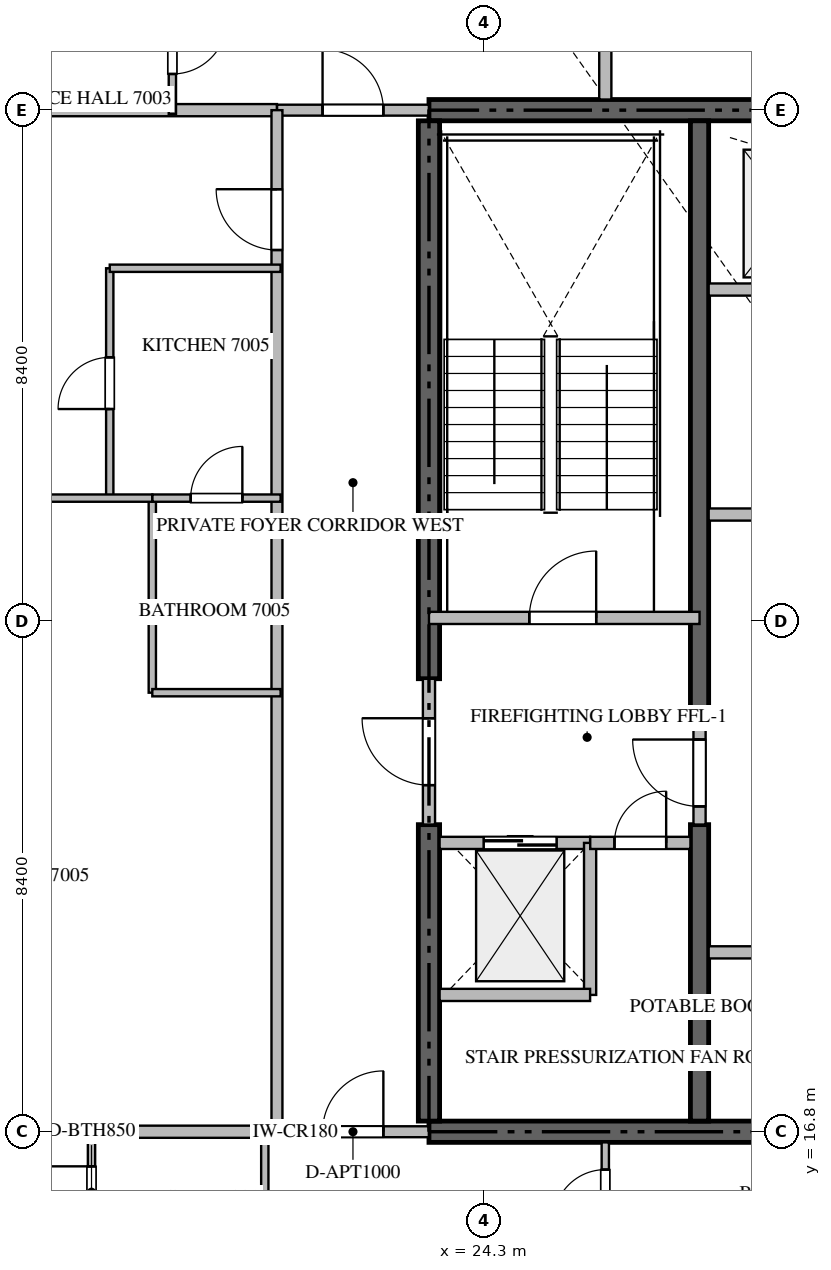
"""IFC4 building model, lengths in metres.
Left out: names, types, materials, properties, quantities, classifications, styles, units other than length and angle.
Written with IfcOpenShell. Run it as: python <this file> out.ifc"""

import sys

from ifc_helpers import new_model, si_unit, direction, frame, frame_2d, origin, place, context, subcontext, project, spatial, rectangle, extrude, source, transform, mapped, element, fill, save


model = new_model("IFC4")
c1 = context("Model", 3, precision=1e-05, world=origin(), true_north=direction((0.0, 1.0)))
c2 = subcontext(c1, "Body", "Model", "MODEL_VIEW")
j1 = project(units=[si_unit("LENGTHUNIT", "METRE"), si_unit("PLANEANGLEUNIT", "RADIAN")], contexts=[c1])
p1 = place(None, origin())
s1 = spatial("IfcSite", under=j1, at=p1, CompositionType="ELEMENT")
p2 = place(p1, origin())
s2 = spatial("IfcBuilding", under=s1, at=p2, CompositionType="ELEMENT")
p3 = place(p2, frame((0.0, 0.0, 279.75)))
s3 = spatial("IfcBuildingStorey", under=s2, at=p3, CompositionType="ELEMENT", Elevation=279.75)
for number, where, z_axis, x_axis in (
    (1, (23.4, 16.8, -0.26), (0.0, 0.0, 1.0), (1.0, 0.0, 0.0)),
    (2, (41.4, 33.6, -0.26), (0.0, 0.0, 1.0), (-1.0, 0.0, 0.0)),
):
    element("IfcWall", number, at=place(p3, frame(where, z_axis=z_axis, x_axis=x_axis)), inside=s3, PredefinedType="SHEAR", context=c2, shape_type="SweptSolid", body=[
        extrude(rectangle(XDim=18.0, YDim=0.35, at=frame_2d((9.0, 0.0))), origin(), (0.0, 0.0, 1.0), 3.848),
    ])
p4 = place(p3, frame((23.4, 16.975, -0.26), z_axis=(0.0, 0.0, 1.0), x_axis=(0.0, 1.0, 0.0)))
e3 = element("IfcWall", 3, at=p4, inside=s3, PredefinedType="SHEAR", context=c2, shape_type="SweptSolid", body=[
    extrude(rectangle(XDim=4.875, YDim=0.35, at=frame_2d((2.438, 0.0))), origin(), (0.0, 0.0, 1.0), 3.848),
])
p5 = place(p3, frame((23.4, 24.25, -0.26), z_axis=(0.0, 0.0, 1.0), x_axis=(0.0, 1.0, 0.0)))
e4 = element("IfcWall", 4, at=p5, inside=s3, PredefinedType="SHEAR", context=c2, shape_type="SweptSolid", body=[
    extrude(rectangle(XDim=9.175, YDim=0.35, at=frame_2d((4.587, 0.0))), origin(), (0.0, 0.0, 1.0), 3.848),
])
p6 = place(p3, frame((27.85, 16.975, -0.26), z_axis=(0.0, 0.0, 1.0), x_axis=(0.0, 1.0, 0.0)))
e5 = element("IfcWall", 5, at=p6, inside=s3, PredefinedType="SHEAR", context=c2, shape_type="SweptSolid", body=[
    extrude(rectangle(XDim=4.875, YDim=0.3, at=frame_2d((2.438, 0.0))), origin(), (0.0, 0.0, 1.0), 3.848),
])
p7 = place(p3, frame((27.85, 23.55, -0.26), z_axis=(0.0, 0.0, 1.0), x_axis=(0.0, 1.0, 0.0)))
e6 = element("IfcWall", 6, at=p7, inside=s3, PredefinedType="SHEAR", context=c2, shape_type="SweptSolid", body=[
    extrude(rectangle(XDim=9.875, YDim=0.3, at=frame_2d((4.938, 0.0))), origin(), (0.0, 0.0, 1.0), 3.848),
])
p8 = place(p3, frame((23.4, 25.25, 0.0), z_axis=(0.0, 0.0, 1.0), x_axis=(1.0, 0.0, 0.0)))
e7 = element("IfcWall", 7, at=p8, inside=s3, PredefinedType="STANDARD", context=c2, shape_type="SweptSolid", body=[
    extrude(rectangle(XDim=4.45, YDim=0.2, at=frame_2d((2.225, 0.0))), origin(), (0.0, 0.0, 1.0), 3.59),
])
p9 = place(p8, frame((1.65, 0.0, 0.0)))
e8 = element("IfcOpeningElement", 8, at=p9, cuts=e7, PredefinedType="OPENING", context=c2, shape_type="SweptSolid", body=[
    extrude(rectangle(XDim=1.1, YDim=2.15, at=frame_2d((0.55, 1.075))), frame((0.0, 0.11, 0.0), z_axis=(0.0, -1.0, 0.0), x_axis=(1.0, 0.0, 0.0)), (0.0, 0.0, 1.0), 0.22),
])
p10 = place(p3, frame((23.575, 21.55, 0.0), z_axis=(0.0, 0.0, 1.0), x_axis=(1.0, 0.0, 0.0)))
e9 = element("IfcWall", 9, at=p10, inside=s3, PredefinedType="STANDARD", context=c2, shape_type="SweptSolid", body=[
    extrude(rectangle(XDim=2.475, YDim=0.2, at=frame_2d((1.238, 0.0))), origin(), (0.0, 0.0, 1.0), 3.59),
])
p11 = place(p10, frame((0.725, 0.0, 0.0)))
e10 = element("IfcOpeningElement", 10, at=p11, cuts=e9, PredefinedType="OPENING", context=c2, shape_type="SweptSolid", body=[
    extrude(rectangle(XDim=1.2, YDim=2.2, at=frame_2d((0.6, 1.1))), frame((0.0, 0.11, 0.0), z_axis=(0.0, -1.0, 0.0), x_axis=(1.0, 0.0, 0.0)), (0.0, 0.0, 1.0), 0.22),
])
p12 = place(p3, frame((28.0, 30.65, 0.0), z_axis=(0.0, 0.0, 1.0), x_axis=(1.0, 0.0, 0.0)))
e11 = element("IfcWall", 11, at=p12, inside=s3, PredefinedType="STANDARD", context=c2, shape_type="SweptSolid", body=[
    extrude(rectangle(XDim=2.55, YDim=0.2, at=frame_2d((1.275, 0.0))), origin(), (0.0, 0.0, 1.0), 3.59),
])
p13 = place(p12, frame((0.85, 0.0, 0.0)))
e12 = element("IfcOpeningElement", 12, at=p13, cuts=e11, PredefinedType="OPENING", context=c2, shape_type="SweptSolid", body=[
    extrude(rectangle(XDim=1.1, YDim=2.2, at=frame_2d((0.55, 1.1))), frame((0.0, 0.11, 0.0), z_axis=(0.0, -1.0, 0.0), x_axis=(1.0, 0.0, 0.0)), (0.0, 0.0, 1.0), 0.22),
])
p14 = place(p3, frame((26.05, 19.05, 0.0), z_axis=(0.0, 0.0, 1.0), x_axis=(0.0, 1.0, 0.0)))
e13 = element("IfcWall", 13, at=p14, inside=s3, PredefinedType="STANDARD", context=c2, shape_type="SweptSolid", body=[
    extrude(rectangle(XDim=2.5, YDim=0.2, at=frame_2d((1.25, 0.0))), origin(), (0.0, 0.0, 1.0), 3.59),
])
p15 = place(p3, frame((23.575, 19.05, 0.0), z_axis=(0.0, 0.0, 1.0), x_axis=(1.0, 0.0, 0.0)))
e14 = element("IfcWall", 14, at=p15, inside=s3, PredefinedType="STANDARD", context=c2, shape_type="SweptSolid", body=[
    extrude(rectangle(XDim=2.475, YDim=0.2, at=frame_2d((1.238, 0.0))), origin(), (0.0, 0.0, 1.0), 3.59),
])
p16 = place(p3, frame((26.052, 21.55, 0.0), z_axis=(0.0, 0.0, 1.0), x_axis=(1.0, 0.0, 0.0)))
e15 = element("IfcWall", 15, at=p16, inside=s3, PredefinedType="STANDARD", context=c2, shape_type="SweptSolid", body=[
    extrude(rectangle(XDim=1.648, YDim=0.2, at=frame_2d((0.824, 0.0))), origin(), (0.0, 0.0, 1.0), 3.59),
])
p17 = place(p16, frame((0.399, 0.0, 0.0)))
e16 = element("IfcOpeningElement", 16, at=p17, cuts=e15, PredefinedType="OPENING", context=c2, shape_type="SweptSolid", body=[
    extrude(rectangle(XDim=0.85, YDim=2.1, at=frame_2d((0.425, 1.05))), frame((0.0, 0.11, 0.0), z_axis=(0.0, -1.0, 0.0), x_axis=(1.0, 0.0, 0.0)), (0.0, 0.0, 1.0), 0.22),
])
p18 = place(p3, frame((23.4, 21.852, 0.0), z_axis=(0.0, 0.0, 1.0), x_axis=(0.0, 1.0, 0.0)))
e17 = element("IfcWall", 17, at=p18, inside=s3, PredefinedType="STANDARD", context=c2, shape_type="SweptSolid", body=[
    extrude(rectangle(XDim=2.396, YDim=0.2, at=frame_2d((1.198, 0.0))), origin(), (0.0, 0.0, 1.0), 3.59),
])
p19 = place(p18, frame((0.648, 0.0, 0.0)))
e18 = element("IfcOpeningElement", 18, at=p19, cuts=e17, PredefinedType="OPENING", context=c2, shape_type="SweptSolid", body=[
    extrude(rectangle(XDim=1.1, YDim=2.15, at=frame_2d((0.55, 1.075))), frame((0.0, 0.11, 0.0), z_axis=(0.0, -1.0, 0.0), x_axis=(1.0, 0.0, 0.0)), (0.0, 0.0, 1.0), 0.22),
])
p20 = place(p3, frame((27.85, 21.852, 0.0), z_axis=(0.0, 0.0, 1.0), x_axis=(0.0, 1.0, 0.0)))
e19 = element("IfcWall", 19, at=p20, inside=s3, PredefinedType="STANDARD", context=c2, shape_type="SweptSolid", body=[
    extrude(rectangle(XDim=1.696, YDim=0.2, at=frame_2d((0.848, 0.0))), origin(), (0.0, 0.0, 1.0), 3.59),
])
p21 = place(p20, frame((0.298, 0.0, 0.0)))
e20 = element("IfcOpeningElement", 20, at=p21, cuts=e19, PredefinedType="OPENING", context=c2, shape_type="SweptSolid", body=[
    extrude(rectangle(XDim=1.1, YDim=2.15, at=frame_2d((0.55, 1.075))), frame((0.0, 0.11, 0.0), z_axis=(0.0, -1.0, 0.0), x_axis=(1.0, 0.0, 0.0)), (0.0, 0.0, 1.0), 0.22),
])
p22 = place(p3, frame((28.0, 19.75, 0.0), z_axis=(0.0, 0.0, 1.0), x_axis=(1.0, 0.0, 0.0)))
e21 = element("IfcWall", 21, at=p22, inside=s3, PredefinedType="STANDARD", context=c2, shape_type="SweptSolid", body=[
    extrude(rectangle(XDim=3.4, YDim=0.2, at=frame_2d((1.7, 0.0))), origin(), (0.0, 0.0, 1.0), 3.59),
])
p23 = place(p22, frame((1.275, 0.0, 0.0)))
e22 = element("IfcOpeningElement", 22, at=p23, cuts=e21, PredefinedType="OPENING", context=c2, shape_type="SweptSolid", body=[
    extrude(rectangle(XDim=0.85, YDim=2.1, at=frame_2d((0.425, 1.05))), frame((0.0, 0.11, 0.0), z_axis=(0.0, -1.0, 0.0), x_axis=(1.0, 0.0, 0.0)), (0.0, 0.0, 1.0), 0.22),
])
p24 = place(p3, frame((28.0, 26.95, 0.0), z_axis=(0.0, 0.0, 1.0), x_axis=(1.0, 0.0, 0.0)))
e23 = element("IfcWall", 23, at=p24, inside=s3, PredefinedType="STANDARD", context=c2, shape_type="SweptSolid", body=[
    extrude(rectangle(XDim=6.95, YDim=0.2, at=frame_2d((3.475, 0.0))), origin(), (0.0, 0.0, 1.0), 3.59),
])
p25 = place(p3, frame((26.3, 33.775, 0.0), z_axis=(0.0, 0.0, 1.0), x_axis=(0.0, 1.0, 0.0)))
e24 = element("IfcWall", 24, at=p25, inside=s3, PredefinedType="PARTITIONING", context=c2, shape_type="SweptSolid", body=[
    extrude(rectangle(XDim=15.343, YDim=0.2, at=frame_2d((7.671, 0.0))), origin(), (0.0, 0.0, 1.0), 3.59),
])
for number, where, z_axis, x_axis in (
    (25, (7.482, 16.8, 0.0), (0.0, 0.0, 1.0), (1.0, 0.0, 0.0)),
    (26, (7.482, 33.6, 0.0), (0.0, 0.0, 1.0), (1.0, 0.0, 0.0)),
):
    element("IfcWall", number, at=place(p3, frame(where, z_axis=z_axis, x_axis=x_axis)), inside=s3, PredefinedType="PARTITIONING", context=c2, shape_type="SweptSolid", body=[
        extrude(rectangle(XDim=13.418, YDim=0.2, at=frame_2d((6.709, 0.0))), origin(), (0.0, 0.0, 1.0), 3.59),
    ])
p26 = place(p3, frame((20.902, 16.8, 0.0), z_axis=(0.0, 0.0, 1.0), x_axis=(1.0, 0.0, 0.0)))
e27 = element("IfcWall", 27, at=p26, inside=s3, PredefinedType="PARTITIONING", context=c2, shape_type="SweptSolid", body=[
    extrude(rectangle(XDim=2.496, YDim=0.18, at=frame_2d((1.248, 0.0))), origin(), (0.0, 0.0, 1.0), 3.59),
])
p27 = place(p26, frame((0.748, 0.0, 0.0)))
e28 = element("IfcOpeningElement", 28, at=p27, cuts=e27, PredefinedType="OPENING", context=c2, shape_type="SweptSolid", body=[
    extrude(rectangle(XDim=1.0, YDim=2.15, at=frame_2d((0.5, 1.075))), frame((0.0, 0.1, 0.0), z_axis=(0.0, -1.0, 0.0), x_axis=(1.0, 0.0, 0.0)), (0.0, 0.0, 1.0), 0.2),
])
p28 = place(p3, frame((20.902, 33.6, 0.0), z_axis=(0.0, 0.0, 1.0), x_axis=(1.0, 0.0, 0.0)))
e29 = element("IfcWall", 29, at=p28, inside=s3, PredefinedType="PARTITIONING", context=c2, shape_type="SweptSolid", body=[
    extrude(rectangle(XDim=2.496, YDim=0.18, at=frame_2d((1.248, 0.0))), origin(), (0.0, 0.0, 1.0), 3.59),
])
p29 = place(p28, frame((0.748, 0.0, 0.0)))
e30 = element("IfcOpeningElement", 30, at=p29, cuts=e29, PredefinedType="OPENING", context=c2, shape_type="SweptSolid", body=[
    extrude(rectangle(XDim=1.0, YDim=2.15, at=frame_2d((0.5, 1.075))), frame((0.0, 0.1, 0.0), z_axis=(0.0, -1.0, 0.0), x_axis=(1.0, 0.0, 0.0)), (0.0, 0.0, 1.0), 0.2),
])
p30 = place(p3, frame((20.9, 16.8, 0.0), z_axis=(0.0, 0.0, 1.0), x_axis=(0.0, 1.0, 0.0)))
e31 = element("IfcWall", 31, at=p30, inside=s3, PredefinedType="PARTITIONING", context=c2, shape_type="SweptSolid", body=[
    extrude(rectangle(XDim=16.8, YDim=0.18, at=frame_2d((8.4, 0.0))), origin(), (0.0, 0.0, 1.0), 3.59),
])
p31 = place(p30, frame((14.5, 0.0, 0.0)))
e32 = element("IfcOpeningElement", 32, at=p31, cuts=e31, PredefinedType="OPENING", context=c2, shape_type="SweptSolid", body=[
    extrude(rectangle(XDim=1.0, YDim=2.15, at=frame_2d((0.5, 1.075))), frame((0.0, 0.1, 0.0), z_axis=(0.0, -1.0, 0.0), x_axis=(1.0, 0.0, 0.0)), (0.0, 0.0, 1.0), 0.2),
])
p32 = place(p3, frame((20.7, 14.05, 0.0), z_axis=(0.0, 0.0, 1.0), x_axis=(0.0, 1.0, 0.0)))
e33 = element("IfcWall", 33, at=p32, inside=s3, PredefinedType="PARTITIONING", context=c2, shape_type="SweptSolid", body=[
    extrude(rectangle(XDim=2.81, YDim=0.12, at=frame_2d((1.405, 0.0))), origin(), (0.0, 0.0, 1.0), 3.59),
])
p33 = place(p3, frame((17.85, 14.752, 0.0), z_axis=(0.0, 0.0, 1.0), x_axis=(0.0, 1.0, 0.0)))
e34 = element("IfcWall", 34, at=p33, inside=s3, PredefinedType="PARTITIONING", context=c2, shape_type="SweptSolid", body=[
    extrude(rectangle(XDim=2.108, YDim=0.12, at=frame_2d((1.054, 0.0))), origin(), (0.0, 0.0, 1.0), 3.59),
])
p34 = place(p33, frame((0.629, 0.0, 0.0)))
e35 = element("IfcOpeningElement", 35, at=p34, cuts=e34, PredefinedType="OPENING", context=c2, shape_type="SweptSolid", body=[
    extrude(rectangle(XDim=0.85, YDim=2.1, at=frame_2d((0.425, 1.05))), frame((0.0, 0.07, 0.0), z_axis=(0.0, -1.0, 0.0), x_axis=(1.0, 0.0, 0.0)), (0.0, 0.0, 1.0), 0.14),
])
p35 = place(p3, frame((26.3, 14.752, 0.0), z_axis=(0.0, 0.0, 1.0), x_axis=(0.0, 1.0, 0.0)))
e36 = element("IfcWall", 36, at=p35, inside=s3, PredefinedType="PARTITIONING", context=c2, shape_type="SweptSolid", body=[
    extrude(rectangle(XDim=1.873, YDim=0.12, at=frame_2d((0.937, 0.0))), origin(), (0.0, 0.0, 1.0), 3.59),
])
p36 = place(p35, frame((0.575, 0.0, 0.0)))
e37 = element("IfcOpeningElement", 37, at=p36, cuts=e36, PredefinedType="OPENING", context=c2, shape_type="SweptSolid", body=[
    extrude(rectangle(XDim=0.85, YDim=2.1, at=frame_2d((0.425, 1.05))), frame((0.0, 0.07, 0.0), z_axis=(0.0, -1.0, 0.0), x_axis=(1.0, 0.0, 0.0)), (0.0, 0.0, 1.0), 0.14),
])
p37 = place(p3, frame((19.18, 35.75, 0.0), z_axis=(0.0, 0.0, 1.0), x_axis=(0.0, -1.0, 0.0)))
e38 = element("IfcWall", 38, at=p37, inside=s3, PredefinedType="PARTITIONING", context=c2, shape_type="SweptSolid", body=[
    extrude(rectangle(XDim=2.21, YDim=0.12, at=frame_2d((1.105, 0.0))), origin(), (0.0, 0.0, 1.0), 3.59),
])
p38 = place(p37, frame((0.655, 0.0, 0.0)))
e39 = element("IfcOpeningElement", 39, at=p38, cuts=e38, PredefinedType="OPENING", context=c2, shape_type="SweptSolid", body=[
    extrude(rectangle(XDim=0.9, YDim=2.1, at=frame_2d((0.45, 1.05))), frame((0.0, 0.07, 0.0), z_axis=(0.0, -1.0, 0.0), x_axis=(1.0, 0.0, 0.0)), (0.0, 0.0, 1.0), 0.14),
])
p39 = place(p3, frame((18.15, 27.22, 0.0), z_axis=(0.0, 0.0, 1.0), x_axis=(0.0, 1.0, 0.0)))
e40 = element("IfcWall", 40, at=p39, inside=s3, PredefinedType="PARTITIONING", context=c2, shape_type="SweptSolid", body=[
    extrude(rectangle(XDim=3.78, YDim=0.12, at=frame_2d((1.89, 0.0))), origin(), (0.0, 0.0, 1.0), 3.59),
])
p40 = place(p39, frame((1.465, 0.0, 0.0)))
e41 = element("IfcOpeningElement", 41, at=p40, cuts=e40, PredefinedType="OPENING", context=c2, shape_type="SweptSolid", body=[
    extrude(rectangle(XDim=0.85, YDim=2.1, at=frame_2d((0.425, 1.05))), frame((0.0, 0.07, 0.0), z_axis=(0.0, -1.0, 0.0), x_axis=(1.0, 0.0, 0.0)), (0.0, 0.0, 1.0), 0.14),
])
p41 = place(p3, frame((18.15, 31.0, 0.0), z_axis=(0.0, 0.0, 1.0), x_axis=(1.0, 0.0, 0.0)))
e42 = element("IfcWall", 42, at=p41, inside=s3, PredefinedType="PARTITIONING", context=c2, shape_type="SweptSolid", body=[
    extrude(rectangle(XDim=2.81, YDim=0.12, at=frame_2d((1.405, 0.0))), origin(), (0.0, 0.0, 1.0), 3.59),
])
p42 = place(p3, frame((18.85, 24.02, 0.0), z_axis=(0.0, 0.0, 1.0), x_axis=(0.0, 1.0, 0.0)))
e43 = element("IfcWall", 43, at=p42, inside=s3, PredefinedType="PARTITIONING", context=c2, shape_type="SweptSolid", body=[
    extrude(rectangle(XDim=3.2, YDim=0.12, at=frame_2d((1.6, 0.0))), origin(), (0.0, 0.0, 1.0), 3.59),
])
p43 = place(p3, frame((18.85, 24.02, 0.0), z_axis=(0.0, 0.0, 1.0), x_axis=(1.0, 0.0, 0.0)))
e44 = element("IfcWall", 44, at=p43, inside=s3, PredefinedType="PARTITIONING", context=c2, shape_type="SweptSolid", body=[
    extrude(rectangle(XDim=2.11, YDim=0.12, at=frame_2d((1.055, 0.0))), origin(), (0.0, 0.0, 1.0), 3.59),
])
p44 = place(p3, frame((11.586, 27.22, 0.0), z_axis=(0.0, 0.0, 1.0), x_axis=(1.0, 0.0, 0.0)))
e45 = element("IfcWall", 45, at=p44, inside=s3, PredefinedType="PARTITIONING", context=c2, shape_type="SweptSolid", body=[
    extrude(rectangle(XDim=7.264, YDim=0.12, at=frame_2d((3.632, 0.0))), origin(), (0.0, 0.0, 1.0), 3.59),
])
p45 = place(p44, frame((3.207, 0.0, 0.0)))
e46 = element("IfcOpeningElement", 46, at=p45, cuts=e45, PredefinedType="OPENING", context=c2, shape_type="SweptSolid", body=[
    extrude(rectangle(XDim=0.85, YDim=2.1, at=frame_2d((0.425, 1.05))), frame((0.0, 0.07, 0.0), z_axis=(0.0, -1.0, 0.0), x_axis=(1.0, 0.0, 0.0)), (0.0, 0.0, 1.0), 0.14),
])
p46 = place(p3, frame((18.852, 27.22, 0.0), z_axis=(0.0, 0.0, 1.0), x_axis=(1.0, 0.0, 0.0)))
e47 = element("IfcWall", 47, at=p46, inside=s3, PredefinedType="PARTITIONING", context=c2, shape_type="SweptSolid", body=[
    extrude(rectangle(XDim=2.108, YDim=0.12, at=frame_2d((1.054, 0.0))), origin(), (0.0, 0.0, 1.0), 3.59),
])
p47 = place(p46, frame((0.629, 0.0, 0.0)))
e48 = element("IfcOpeningElement", 48, at=p47, cuts=e47, PredefinedType="OPENING", context=c2, shape_type="SweptSolid", body=[
    extrude(rectangle(XDim=0.85, YDim=2.1, at=frame_2d((0.425, 1.05))), frame((0.0, 0.07, 0.0), z_axis=(0.0, -1.0, 0.0), x_axis=(1.0, 0.0, 0.0)), (0.0, 0.0, 1.0), 0.14),
])
m1 = source(origin(), c2, "Body", "SweptSolid", [
    extrude(rectangle(XDim=1.1, YDim=2.15, at=frame_2d((0.55, 1.075))), frame((0.0, 0.025, 0.0), z_axis=(0.0, -1.0, 0.0), x_axis=(1.0, 0.0, 0.0)), (0.0, 0.0, 1.0), 0.05),
])
p48 = place(p9, origin())
e49 = element("IfcDoor", 49, at=p48, inside=s3, OperationType="SINGLE_SWING_RIGHT", PredefinedType="DOOR", context=c2, shape_type="MappedRepresentation", body=[
    mapped(m1, transform((0.0, 0.0, 0.0), scale=1.0)),
])
fill(e8, e49)
m2 = source(origin(), c2, "Body", "SweptSolid", [
    extrude(rectangle(XDim=1.2, YDim=2.2, at=frame_2d((0.6, 1.1))), frame((0.0, 0.025, 0.0), z_axis=(0.0, -1.0, 0.0), x_axis=(1.0, 0.0, 0.0)), (0.0, 0.0, 1.0), 0.05),
])
p49 = place(p11, origin())
e50 = element("IfcDoor", 50, at=p49, inside=s3, OperationType="DOUBLE_DOOR_SLIDING", PredefinedType="DOOR", context=c2, shape_type="MappedRepresentation", body=[
    mapped(m2, transform((0.0, 0.0, 0.0), scale=1.0)),
])
fill(e10, e50)
m3 = source(origin(), c2, "Body", "SweptSolid", [
    extrude(rectangle(XDim=0.85, YDim=2.1, at=frame_2d((0.425, 1.05))), frame((0.0, 0.025, 0.0), z_axis=(0.0, -1.0, 0.0), x_axis=(1.0, 0.0, 0.0)), (0.0, 0.0, 1.0), 0.05),
])
p50 = place(p17, origin())
e51 = element("IfcDoor", 51, at=p50, inside=s3, OperationType="SINGLE_SWING_RIGHT", PredefinedType="DOOR", context=c2, shape_type="MappedRepresentation", body=[
    mapped(m3, transform((0.0, 0.0, 0.0), scale=1.0)),
])
fill(e16, e51)
p51 = place(p19, origin())
e52 = element("IfcDoor", 52, at=p51, inside=s3, OperationType="SINGLE_SWING_RIGHT", PredefinedType="DOOR", context=c2, shape_type="MappedRepresentation", body=[
    mapped(m1, transform((0.0, 0.0, 0.0), scale=1.0)),
])
fill(e18, e52)
p52 = place(p21, origin())
e53 = element("IfcDoor", 53, at=p52, inside=s3, OperationType="SINGLE_SWING_RIGHT", PredefinedType="DOOR", context=c2, shape_type="MappedRepresentation", body=[
    mapped(m1, transform((0.0, 0.0, 0.0), scale=1.0)),
])
fill(e20, e53)
m4 = source(origin(), c2, "Body", "SweptSolid", [
    extrude(rectangle(XDim=1.0, YDim=2.15, at=frame_2d((0.5, 1.075))), frame((0.0, 0.025, 0.0), z_axis=(0.0, -1.0, 0.0), x_axis=(1.0, 0.0, 0.0)), (0.0, 0.0, 1.0), 0.05),
])
p53 = place(p27, origin())
e54 = element("IfcDoor", 54, at=p53, inside=s3, OperationType="SINGLE_SWING_RIGHT", PredefinedType="DOOR", context=c2, shape_type="MappedRepresentation", body=[
    mapped(m4, transform((0.0, 0.0, 0.0), scale=1.0)),
])
fill(e28, e54)
p54 = place(p29, origin())
e55 = element("IfcDoor", 55, at=p54, inside=s3, OperationType="SINGLE_SWING_LEFT", PredefinedType="DOOR", context=c2, shape_type="MappedRepresentation", body=[
    mapped(m4, transform((0.0, 0.0, 0.0), scale=1.0)),
])
fill(e30, e55)
p55 = place(p31, origin())
e56 = element("IfcDoor", 56, at=p55, inside=s3, OperationType="SINGLE_SWING_RIGHT", PredefinedType="DOOR", context=c2, shape_type="MappedRepresentation", body=[
    mapped(m4, transform((0.0, 0.0, 0.0), scale=1.0)),
])
fill(e32, e56)
p56 = place(p34, origin())
e57 = element("IfcDoor", 57, at=p56, inside=s3, OperationType="SINGLE_SWING_RIGHT", PredefinedType="DOOR", context=c2, shape_type="MappedRepresentation", body=[
    mapped(m3, transform((0.0, 0.0, 0.0), scale=1.0)),
])
fill(e35, e57)
p57 = place(p36, origin())
e58 = element("IfcDoor", 58, at=p57, inside=s3, OperationType="SINGLE_SWING_LEFT", PredefinedType="DOOR", context=c2, shape_type="MappedRepresentation", body=[
    mapped(m3, transform((0.0, 0.0, 0.0), scale=1.0)),
])
fill(e37, e58)
m5 = source(origin(), c2, "Body", "SweptSolid", [
    extrude(rectangle(XDim=0.9, YDim=2.1, at=frame_2d((0.45, 1.05))), frame((0.0, 0.025, 0.0), z_axis=(0.0, -1.0, 0.0), x_axis=(1.0, 0.0, 0.0)), (0.0, 0.0, 1.0), 0.05),
])
p58 = place(p38, origin())
e59 = element("IfcDoor", 59, at=p58, inside=s3, OperationType="SINGLE_SWING_LEFT", PredefinedType="DOOR", context=c2, shape_type="MappedRepresentation", body=[
    mapped(m5, transform((0.0, 0.0, 0.0), scale=1.0)),
])
fill(e39, e59)
p59 = place(p40, origin())
e60 = element("IfcDoor", 60, at=p59, inside=s3, OperationType="SINGLE_SWING_LEFT", PredefinedType="DOOR", context=c2, shape_type="MappedRepresentation", body=[
    mapped(m3, transform((0.0, 0.0, 0.0), scale=1.0)),
])
fill(e41, e60)
p60 = place(p47, origin())
e61 = element("IfcDoor", 61, at=p60, inside=s3, OperationType="SINGLE_SWING_RIGHT", PredefinedType="DOOR", context=c2, shape_type="MappedRepresentation", body=[
    mapped(m3, transform((0.0, 0.0, 0.0), scale=1.0)),
])
fill(e48, e61)
save(model, sys.argv[1])
